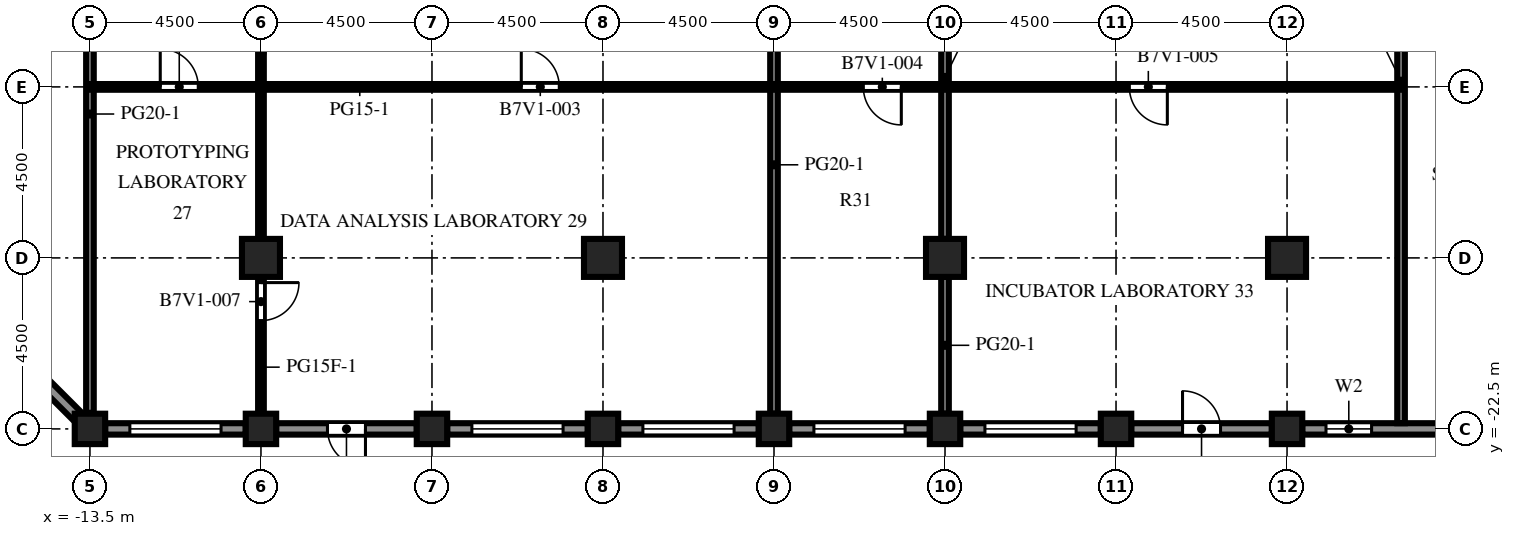
"""IFC4 building model, lengths in metres.
Left out: names, types, materials, properties, quantities, classifications, styles, units other than length and angle.
Written with IfcOpenShell. Run it as: python <this file> out.ifc"""

import sys

from ifc_helpers import new_model, si_unit, direction, frame, frame_2d, origin, origin_2d, place, context, subcontext, project, spatial, rectangle, extrude, element, fill, save


model = new_model("IFC4")
c1 = context("Model", 3, precision=1e-05, world=origin(), true_north=direction((0.0, 1.0)))
c2 = subcontext(c1, "Body", "Model", "MODEL_VIEW")
j1 = project(units=[si_unit("LENGTHUNIT", "METRE"), si_unit("PLANEANGLEUNIT", "RADIAN")], contexts=[c1])
p1 = place(None, origin())
s1 = spatial("IfcSite", under=j1, at=p1, CompositionType="ELEMENT")
p2 = place(p1, origin())
s2 = spatial("IfcBuilding", under=s1, at=p2, CompositionType="ELEMENT")
p3 = place(p2, frame((0.0, 0.0, 243.9)))
s3 = spatial("IfcBuildingStorey", under=s2, at=p3, CompositionType="ELEMENT", Elevation=243.9)
for number, where, z_axis, x_axis in (
    (1, (-13.5, -22.5, 0.0), (0.0, 0.0, 1.0), (1.0, 0.0, 0.0)),
    (2, (-9.0, -22.5, 0.0), (0.0, 0.0, 1.0), (1.0, 0.0, 0.0)),
    (3, (-4.5, -22.5, 0.0), (0.0, 0.0, 1.0), (1.0, 0.0, 0.0)),
    (4, (0.0, -22.5, 0.0), (0.0, 0.0, 1.0), (1.0, 0.0, 0.0)),
    (5, (4.5, -22.5, 0.0), (0.0, 0.0, 1.0), (1.0, 0.0, 0.0)),
    (6, (9.0, -22.5, 0.0), (0.0, 0.0, 1.0), (1.0, 0.0, 0.0)),
    (7, (13.5, -22.5, 0.0), (0.0, 0.0, 1.0), (1.0, 0.0, 0.0)),
    (8, (18.0, -22.5, 0.0), (0.0, 0.0, 1.0), (1.0, 0.0, 0.0)),
):
    element("IfcColumn", number, at=place(p3, frame(where, z_axis=z_axis, x_axis=x_axis)), inside=s3, PredefinedType="COLUMN", context=c2, shape_type="SweptSolid", body=[
        extrude(rectangle(XDim=0.8, YDim=0.8, at=origin_2d()), origin(), (0.0, 0.0, 1.0), 4.1),
    ])
for number, where, z_axis, x_axis in (
    (9, (-9.0, -18.0, 0.0), (0.0, 0.0, 1.0), (1.0, 0.0, 0.0)),
    (10, (0.0, -18.0, 0.0), (0.0, 0.0, 1.0), (1.0, 0.0, 0.0)),
    (11, (9.0, -18.0, 0.0), (0.0, 0.0, 1.0), (1.0, 0.0, 0.0)),
    (12, (18.0, -18.0, 0.0), (0.0, 0.0, 1.0), (1.0, 0.0, 0.0)),
):
    element("IfcColumn", number, at=place(p3, frame(where, z_axis=z_axis, x_axis=x_axis)), inside=s3, PredefinedType="COLUMN", context=c2, shape_type="SweptSolid", body=[
        extrude(rectangle(XDim=1.0, YDim=1.0, at=origin_2d()), origin(), (0.0, 0.0, 1.0), 4.1),
    ])
p4 = place(p3, frame((-9.4, -22.5, 0.0), z_axis=(0.0, 0.0, 1.0), x_axis=(-1.0, 0.0, 0.0)))
e13 = element("IfcWall", 13, at=p4, inside=s3, PredefinedType="SOLIDWALL", context=c2, shape_type="SweptSolid", body=[
    extrude(rectangle(XDim=3.7, YDim=0.3, at=frame_2d((1.85, 0.0))), origin(), (0.0, 0.0, 1.0), 2.85),
])
p5 = place(p4, frame((0.65, 0.0, 0.8)))
e14 = element("IfcOpeningElement", 14, at=p5, cuts=e13, PredefinedType="OPENING", context=c2, shape_type="SweptSolid", body=[
    extrude(rectangle(XDim=2.4, YDim=1.7, at=frame_2d((1.2, 0.85))), frame((0.0, 0.16, 0.0), z_axis=(0.0, -1.0, 0.0), x_axis=(1.0, 0.0, 0.0)), (0.0, 0.0, 1.0), 0.32),
])
p6 = place(p3, frame((-4.9, -22.5, 0.0), z_axis=(0.0, 0.0, 1.0), x_axis=(-1.0, 0.0, 0.0)))
e15 = element("IfcWall", 15, at=p6, inside=s3, PredefinedType="SOLIDWALL", context=c2, shape_type="SweptSolid", body=[
    extrude(rectangle(XDim=3.7, YDim=0.3, at=frame_2d((1.85, 0.0))), origin(), (0.0, 0.0, 1.0), 2.85),
])
p7 = place(p6, frame((1.35, 0.0, 0.0)))
e16 = element("IfcOpeningElement", 16, at=p7, cuts=e15, PredefinedType="OPENING", context=c2, shape_type="SweptSolid", body=[
    extrude(rectangle(XDim=1.0, YDim=2.2, at=frame_2d((0.5, 1.1))), frame((0.0, 0.16, 0.0), z_axis=(0.0, -1.0, 0.0), x_axis=(1.0, 0.0, 0.0)), (0.0, 0.0, 1.0), 0.32),
])
p8 = place(p3, frame((-0.4, -22.5, 0.0), z_axis=(0.0, 0.0, 1.0), x_axis=(-1.0, 0.0, 0.0)))
e17 = element("IfcWall", 17, at=p8, inside=s3, PredefinedType="SOLIDWALL", context=c2, shape_type="SweptSolid", body=[
    extrude(rectangle(XDim=3.7, YDim=0.3, at=frame_2d((1.85, 0.0))), origin(), (0.0, 0.0, 1.0), 2.85),
])
p9 = place(p8, frame((0.65, 0.0, 0.8)))
e18 = element("IfcOpeningElement", 18, at=p9, cuts=e17, PredefinedType="OPENING", context=c2, shape_type="SweptSolid", body=[
    extrude(rectangle(XDim=2.4, YDim=1.7, at=frame_2d((1.2, 0.85))), frame((0.0, 0.16, 0.0), z_axis=(0.0, -1.0, 0.0), x_axis=(1.0, 0.0, 0.0)), (0.0, 0.0, 1.0), 0.32),
])
p10 = place(p3, frame((4.1, -22.5, 0.0), z_axis=(0.0, 0.0, 1.0), x_axis=(-1.0, 0.0, 0.0)))
e19 = element("IfcWall", 19, at=p10, inside=s3, PredefinedType="SOLIDWALL", context=c2, shape_type="SweptSolid", body=[
    extrude(rectangle(XDim=3.7, YDim=0.3, at=frame_2d((1.85, 0.0))), origin(), (0.0, 0.0, 1.0), 2.85),
])
p11 = place(p10, frame((0.65, 0.0, 0.8)))
e20 = element("IfcOpeningElement", 20, at=p11, cuts=e19, PredefinedType="OPENING", context=c2, shape_type="SweptSolid", body=[
    extrude(rectangle(XDim=2.4, YDim=1.7, at=frame_2d((1.2, 0.85))), frame((0.0, 0.16, 0.0), z_axis=(0.0, -1.0, 0.0), x_axis=(1.0, 0.0, 0.0)), (0.0, 0.0, 1.0), 0.32),
])
p12 = place(p3, frame((8.6, -22.5, 0.0), z_axis=(0.0, 0.0, 1.0), x_axis=(-1.0, 0.0, 0.0)))
e21 = element("IfcWall", 21, at=p12, inside=s3, PredefinedType="SOLIDWALL", context=c2, shape_type="SweptSolid", body=[
    extrude(rectangle(XDim=3.7, YDim=0.3, at=frame_2d((1.85, 0.0))), origin(), (0.0, 0.0, 1.0), 2.85),
])
p13 = place(p12, frame((0.65, 0.0, 0.8)))
e22 = element("IfcOpeningElement", 22, at=p13, cuts=e21, PredefinedType="OPENING", context=c2, shape_type="SweptSolid", body=[
    extrude(rectangle(XDim=2.4, YDim=1.7, at=frame_2d((1.2, 0.85))), frame((0.0, 0.16, 0.0), z_axis=(0.0, -1.0, 0.0), x_axis=(1.0, 0.0, 0.0)), (0.0, 0.0, 1.0), 0.32),
])
p14 = place(p3, frame((13.1, -22.5, 0.0), z_axis=(0.0, 0.0, 1.0), x_axis=(-1.0, 0.0, 0.0)))
e23 = element("IfcWall", 23, at=p14, inside=s3, PredefinedType="SOLIDWALL", context=c2, shape_type="SweptSolid", body=[
    extrude(rectangle(XDim=3.7, YDim=0.3, at=frame_2d((1.85, 0.0))), origin(), (0.0, 0.0, 1.0), 2.85),
])
p15 = place(p14, frame((0.65, 0.0, 0.8)))
e24 = element("IfcOpeningElement", 24, at=p15, cuts=e23, PredefinedType="OPENING", context=c2, shape_type="SweptSolid", body=[
    extrude(rectangle(XDim=2.4, YDim=1.7, at=frame_2d((1.2, 0.85))), frame((0.0, 0.16, 0.0), z_axis=(0.0, -1.0, 0.0), x_axis=(1.0, 0.0, 0.0)), (0.0, 0.0, 1.0), 0.32),
])
p16 = place(p3, frame((17.6, -22.5, 0.0), z_axis=(0.0, 0.0, 1.0), x_axis=(-1.0, 0.0, 0.0)))
e25 = element("IfcWall", 25, at=p16, inside=s3, PredefinedType="SOLIDWALL", context=c2, shape_type="SweptSolid", body=[
    extrude(rectangle(XDim=3.7, YDim=0.3, at=frame_2d((1.85, 0.0))), origin(), (0.0, 0.0, 1.0), 2.85),
])
p17 = place(p16, frame((1.35, 0.0, 0.0)))
e26 = element("IfcOpeningElement", 26, at=p17, cuts=e25, PredefinedType="OPENING", context=c2, shape_type="SweptSolid", body=[
    extrude(rectangle(XDim=1.0, YDim=2.2, at=frame_2d((0.5, 1.1))), frame((0.0, 0.16, 0.0), z_axis=(0.0, -1.0, 0.0), x_axis=(1.0, 0.0, 0.0)), (0.0, 0.0, 1.0), 0.32),
])
p18 = place(p3, frame((22.1, -22.5, 0.0), z_axis=(0.0, 0.0, 1.0), x_axis=(-1.0, 0.0, 0.0)))
e27 = element("IfcWall", 27, at=p18, inside=s3, PredefinedType="SOLIDWALL", context=c2, shape_type="SweptSolid", body=[
    extrude(rectangle(XDim=3.7, YDim=0.3, at=frame_2d((1.85, 0.0))), origin(), (0.0, 0.0, 1.0), 2.85),
])
p19 = place(p18, frame((1.875, 0.0, 0.8)))
e28 = element("IfcOpeningElement", 28, at=p19, cuts=e27, PredefinedType="OPENING", context=c2, shape_type="SweptSolid", body=[
    extrude(rectangle(XDim=1.2, YDim=1.7, at=frame_2d((0.6, 0.85))), frame((0.0, 0.16, 0.0), z_axis=(0.0, -1.0, 0.0), x_axis=(1.0, 0.0, 0.0)), (0.0, 0.0, 1.0), 0.32),
])
p20 = place(p3, frame((-13.794, -22.206, 0.0), z_axis=(0.0, 0.0, 1.0), x_axis=(-0.707106781187, 0.707106781187, 0.0)))
e29 = element("IfcWall", 29, at=p20, inside=s3, PredefinedType="SOLIDWALL", context=c2, shape_type="SweptSolid", body=[
    extrude(rectangle(XDim=5.532, YDim=0.3, at=frame_2d((2.766, 0.0))), origin(), (0.0, 0.0, 1.0), 2.85),
])
p21 = place(p20, frame((2.166, 0.0, 0.0)))
e30 = element("IfcOpeningElement", 30, at=p21, cuts=e29, PredefinedType="OPENING", context=c2, shape_type="SweptSolid", body=[
    extrude(rectangle(XDim=1.2, YDim=2.2, at=frame_2d((0.6, 1.1))), frame((0.0, 0.16, 0.0), z_axis=(0.0, -1.0, 0.0), x_axis=(1.0, 0.0, 0.0)), (0.0, 0.0, 1.0), 0.32),
])
p22 = place(p3, frame((-13.5, -22.077, 0.0), z_axis=(0.0, 0.0, 1.0), x_axis=(0.0, 1.0, 0.0)))
e31 = element("IfcWall", 31, at=p22, inside=s3, PredefinedType="PARTITIONING", context=c2, shape_type="SweptSolid", body=[
    extrude(rectangle(XDim=25.327, YDim=0.2, at=frame_2d((12.664, 0.0))), origin(), (0.0, 0.0, 1.0), 3.65),
])
p23 = place(p22, frame((15.727, 0.0, 0.0)))
e32 = element("IfcOpeningElement", 32, at=p23, cuts=e31, PredefinedType="OPENING", context=c2, shape_type="SweptSolid", body=[
    extrude(rectangle(XDim=1.0, YDim=2.1, at=frame_2d((0.5, 1.05))), frame((0.0, 0.11, 0.0), z_axis=(0.0, -1.0, 0.0), x_axis=(1.0, 0.0, 0.0)), (0.0, 0.0, 1.0), 0.22),
])
p24 = place(p3, frame((-9.0, -18.5, 0.0), z_axis=(0.0, 0.0, 1.0), x_axis=(0.0, -1.0, 0.0)))
e33 = element("IfcWall", 33, at=p24, inside=s3, PredefinedType="PARTITIONING", context=c2, shape_type="SweptSolid", body=[
    extrude(rectangle(XDim=3.6, YDim=0.15, at=frame_2d((1.8, 0.0))), origin(), (0.0, 0.0, 1.0), 3.65),
])
p25 = place(p24, frame((0.15, 0.0, 0.0)))
e34 = element("IfcOpeningElement", 34, at=p25, cuts=e33, PredefinedType="OPENING", context=c2, shape_type="SweptSolid", body=[
    extrude(rectangle(XDim=1.0, YDim=2.1, at=frame_2d((0.5, 1.05))), frame((0.0, 0.085, 0.0), z_axis=(0.0, -1.0, 0.0), x_axis=(1.0, 0.0, 0.0)), (0.0, 0.0, 1.0), 0.17),
])
p26 = place(p3, frame((-9.0, -17.5, 0.0), z_axis=(0.0, 0.0, 1.0), x_axis=(0.0, 1.0, 0.0)))
e35 = element("IfcWall", 35, at=p26, inside=s3, PredefinedType="PARTITIONING", context=c2, shape_type="SweptSolid", body=[
    extrude(rectangle(XDim=8.5, YDim=0.15, at=frame_2d((4.25, 0.0))), origin(), (0.0, 0.0, 1.0), 3.65),
])
p27 = place(p3, frame((4.5, -22.1, 0.0), z_axis=(0.0, 0.0, 1.0), x_axis=(0.0, 1.0, 0.0)))
e36 = element("IfcWall", 36, at=p27, inside=s3, PredefinedType="PARTITIONING", context=c2, shape_type="SweptSolid", body=[
    extrude(rectangle(XDim=13.1, YDim=0.2, at=frame_2d((6.55, 0.0))), origin(), (0.0, 0.0, 1.0), 3.65),
])
p28 = place(p3, frame((9.0, -22.1, 0.0), z_axis=(0.0, 0.0, 1.0), x_axis=(0.0, 1.0, 0.0)))
e37 = element("IfcWall", 37, at=p28, inside=s3, PredefinedType="PARTITIONING", context=c2, shape_type="SweptSolid", body=[
    extrude(rectangle(XDim=3.6, YDim=0.2, at=frame_2d((1.8, 0.0))), origin(), (0.0, 0.0, 1.0), 3.65),
])
p29 = place(p3, frame((9.0, -17.5, 0.0), z_axis=(0.0, 0.0, 1.0), x_axis=(0.0, 1.0, 0.0)))
e38 = element("IfcWall", 38, at=p29, inside=s3, PredefinedType="PARTITIONING", context=c2, shape_type="SweptSolid", body=[
    extrude(rectangle(XDim=8.5, YDim=0.2, at=frame_2d((4.25, 0.0))), origin(), (0.0, 0.0, 1.0), 3.65),
])
p30 = place(p3, frame((21.0, 3.25, 0.0), z_axis=(0.0, 0.0, 1.0), x_axis=(0.0, -1.0, 0.0)))
e39 = element("IfcWall", 39, at=p30, inside=s3, PredefinedType="PARTITIONING", context=c2, shape_type="SweptSolid", body=[
    extrude(rectangle(XDim=25.6, YDim=0.2, at=frame_2d((12.8, 0.0))), origin(), (0.0, 0.0, 1.0), 3.65),
])
p31 = place(p30, frame((6.6, 0.0, 0.0)))
e40 = element("IfcOpeningElement", 40, at=p31, cuts=e39, PredefinedType="OPENING", context=c2, shape_type="SweptSolid", body=[
    extrude(rectangle(XDim=1.0, YDim=2.1, at=frame_2d((0.5, 1.05))), frame((0.0, 0.11, 0.0), z_axis=(0.0, -1.0, 0.0), x_axis=(1.0, 0.0, 0.0)), (0.0, 0.0, 1.0), 0.22),
])
p32 = place(p3, frame((21.0, -13.5, 0.0), z_axis=(0.0, 0.0, 1.0), x_axis=(-1.0, 0.0, 0.0)))
e41 = element("IfcWall", 41, at=p32, inside=s3, PredefinedType="PARTITIONING", context=c2, shape_type="SweptSolid", body=[
    extrude(rectangle(XDim=34.5, YDim=0.15, at=frame_2d((17.25, 0.0))), origin(), (0.0, 0.0, 1.0), 3.65),
])
p33 = place(p32, frame((31.65, 0.0, 0.0)))
e42 = element("IfcOpeningElement", 42, at=p33, cuts=e41, PredefinedType="OPENING", context=c2, shape_type="SweptSolid", body=[
    extrude(rectangle(XDim=1.0, YDim=2.1, at=frame_2d((0.5, 1.05))), frame((0.0, 0.085, 0.0), z_axis=(0.0, -1.0, 0.0), x_axis=(1.0, 0.0, 0.0)), (0.0, 0.0, 1.0), 0.17),
])
p34 = place(p32, frame((22.15, 0.0, 0.0)))
e43 = element("IfcOpeningElement", 43, at=p34, cuts=e41, PredefinedType="OPENING", context=c2, shape_type="SweptSolid", body=[
    extrude(rectangle(XDim=1.0, YDim=2.1, at=frame_2d((0.5, 1.05))), frame((0.0, 0.085, 0.0), z_axis=(0.0, -1.0, 0.0), x_axis=(1.0, 0.0, 0.0)), (0.0, 0.0, 1.0), 0.17),
])
p35 = place(p32, frame((13.15, 0.0, 0.0)))
e44 = element("IfcOpeningElement", 44, at=p35, cuts=e41, PredefinedType="OPENING", context=c2, shape_type="SweptSolid", body=[
    extrude(rectangle(XDim=1.0, YDim=2.1, at=frame_2d((0.5, 1.05))), frame((0.0, 0.085, 0.0), z_axis=(0.0, -1.0, 0.0), x_axis=(1.0, 0.0, 0.0)), (0.0, 0.0, 1.0), 0.17),
])
p36 = place(p32, frame((6.15, 0.0, 0.0)))
e45 = element("IfcOpeningElement", 45, at=p36, cuts=e41, PredefinedType="OPENING", context=c2, shape_type="SweptSolid", body=[
    extrude(rectangle(XDim=1.0, YDim=2.1, at=frame_2d((0.5, 1.05))), frame((0.0, 0.085, 0.0), z_axis=(0.0, -1.0, 0.0), x_axis=(1.0, 0.0, 0.0)), (0.0, 0.0, 1.0), 0.17),
])
p37 = place(p5, origin())
e46 = element("IfcWindow", 46, at=p37, inside=s3, PartitioningType="SINGLE_PANEL", PredefinedType="WINDOW", context=c2, shape_type="SweptSolid", body=[
    extrude(rectangle(XDim=2.4, YDim=1.7, at=frame_2d((1.2, 0.85))), frame((0.0, 0.03, 0.0), z_axis=(0.0, -1.0, 0.0), x_axis=(1.0, 0.0, 0.0)), (0.0, 0.0, 1.0), 0.06),
])
fill(e14, e46)
p38 = place(p7, origin())
e47 = element("IfcDoor", 47, at=p38, inside=s3, OperationType="SINGLE_SWING_LEFT", PredefinedType="DOOR", context=c2, shape_type="SweptSolid", body=[
    extrude(rectangle(XDim=1.0, YDim=2.2, at=frame_2d((0.5, 1.1))), frame((0.0, 0.025, 0.0), z_axis=(0.0, -1.0, 0.0), x_axis=(1.0, 0.0, 0.0)), (0.0, 0.0, 1.0), 0.05),
])
fill(e16, e47)
p39 = place(p9, origin())
e48 = element("IfcWindow", 48, at=p39, inside=s3, PartitioningType="SINGLE_PANEL", PredefinedType="WINDOW", context=c2, shape_type="SweptSolid", body=[
    extrude(rectangle(XDim=2.4, YDim=1.7, at=frame_2d((1.2, 0.85))), frame((0.0, 0.03, 0.0), z_axis=(0.0, -1.0, 0.0), x_axis=(1.0, 0.0, 0.0)), (0.0, 0.0, 1.0), 0.06),
])
fill(e18, e48)
p40 = place(p11, origin())
e49 = element("IfcWindow", 49, at=p40, inside=s3, PartitioningType="SINGLE_PANEL", PredefinedType="WINDOW", context=c2, shape_type="SweptSolid", body=[
    extrude(rectangle(XDim=2.4, YDim=1.7, at=frame_2d((1.2, 0.85))), frame((0.0, 0.03, 0.0), z_axis=(0.0, -1.0, 0.0), x_axis=(1.0, 0.0, 0.0)), (0.0, 0.0, 1.0), 0.06),
])
fill(e20, e49)
p41 = place(p13, origin())
e50 = element("IfcWindow", 50, at=p41, inside=s3, PartitioningType="SINGLE_PANEL", PredefinedType="WINDOW", context=c2, shape_type="SweptSolid", body=[
    extrude(rectangle(XDim=2.4, YDim=1.7, at=frame_2d((1.2, 0.85))), frame((0.0, 0.03, 0.0), z_axis=(0.0, -1.0, 0.0), x_axis=(1.0, 0.0, 0.0)), (0.0, 0.0, 1.0), 0.06),
])
fill(e22, e50)
p42 = place(p15, origin())
e51 = element("IfcWindow", 51, at=p42, inside=s3, PartitioningType="SINGLE_PANEL", PredefinedType="WINDOW", context=c2, shape_type="SweptSolid", body=[
    extrude(rectangle(XDim=2.4, YDim=1.7, at=frame_2d((1.2, 0.85))), frame((0.0, 0.03, 0.0), z_axis=(0.0, -1.0, 0.0), x_axis=(1.0, 0.0, 0.0)), (0.0, 0.0, 1.0), 0.06),
])
fill(e24, e51)
p43 = place(p17, origin())
e52 = element("IfcDoor", 52, at=p43, inside=s3, OperationType="SINGLE_SWING_RIGHT", PredefinedType="DOOR", context=c2, shape_type="SweptSolid", body=[
    extrude(rectangle(XDim=1.0, YDim=2.2, at=frame_2d((0.5, 1.1))), frame((0.0, 0.025, 0.0), z_axis=(0.0, -1.0, 0.0), x_axis=(1.0, 0.0, 0.0)), (0.0, 0.0, 1.0), 0.05),
])
fill(e26, e52)
p44 = place(p19, origin())
e53 = element("IfcWindow", 53, at=p44, inside=s3, PartitioningType="SINGLE_PANEL", PredefinedType="WINDOW", context=c2, shape_type="SweptSolid", body=[
    extrude(rectangle(XDim=1.2, YDim=1.7, at=frame_2d((0.6, 0.85))), frame((0.0, 0.03, 0.0), z_axis=(0.0, -1.0, 0.0), x_axis=(1.0, 0.0, 0.0)), (0.0, 0.0, 1.0), 0.06),
])
fill(e28, e53)
p45 = place(p33, origin())
e54 = element("IfcDoor", 54, at=p45, inside=s3, OperationType="SINGLE_SWING_RIGHT", PredefinedType="DOOR", context=c2, shape_type="SweptSolid", body=[
    extrude(rectangle(XDim=1.0, YDim=2.1, at=frame_2d((0.5, 1.05))), frame((0.0, 0.025, 0.0), z_axis=(0.0, -1.0, 0.0), x_axis=(1.0, 0.0, 0.0)), (0.0, 0.0, 1.0), 0.05),
])
fill(e42, e54)
p46 = place(p34, origin())
e55 = element("IfcDoor", 55, at=p46, inside=s3, OperationType="SINGLE_SWING_RIGHT", PredefinedType="DOOR", context=c2, shape_type="SweptSolid", body=[
    extrude(rectangle(XDim=1.0, YDim=2.1, at=frame_2d((0.5, 1.05))), frame((0.0, 0.025, 0.0), z_axis=(0.0, -1.0, 0.0), x_axis=(1.0, 0.0, 0.0)), (0.0, 0.0, 1.0), 0.05),
])
fill(e43, e55)
p47 = place(p35, origin())
e56 = element("IfcDoor", 56, at=p47, inside=s3, OperationType="SINGLE_SWING_LEFT", PredefinedType="DOOR", context=c2, shape_type="SweptSolid", body=[
    extrude(rectangle(XDim=1.0, YDim=2.1, at=frame_2d((0.5, 1.05))), frame((0.0, 0.025, 0.0), z_axis=(0.0, -1.0, 0.0), x_axis=(1.0, 0.0, 0.0)), (0.0, 0.0, 1.0), 0.05),
])
fill(e44, e56)
p48 = place(p36, origin())
e57 = element("IfcDoor", 57, at=p48, inside=s3, OperationType="SINGLE_SWING_LEFT", PredefinedType="DOOR", context=c2, shape_type="SweptSolid", body=[
    extrude(rectangle(XDim=1.0, YDim=2.1, at=frame_2d((0.5, 1.05))), frame((0.0, 0.025, 0.0), z_axis=(0.0, -1.0, 0.0), x_axis=(1.0, 0.0, 0.0)), (0.0, 0.0, 1.0), 0.05),
])
fill(e45, e57)
p49 = place(p25, origin())
e58 = element("IfcDoor", 58, at=p49, inside=s3, OperationType="SINGLE_SWING_LEFT", PredefinedType="DOOR", context=c2, shape_type="SweptSolid", body=[
    extrude(rectangle(XDim=1.0, YDim=2.1, at=frame_2d((0.5, 1.05))), frame((0.0, 0.025, 0.0), z_axis=(0.0, -1.0, 0.0), x_axis=(1.0, 0.0, 0.0)), (0.0, 0.0, 1.0), 0.05),
])
fill(e34, e58)
save(model, sys.argv[1])
